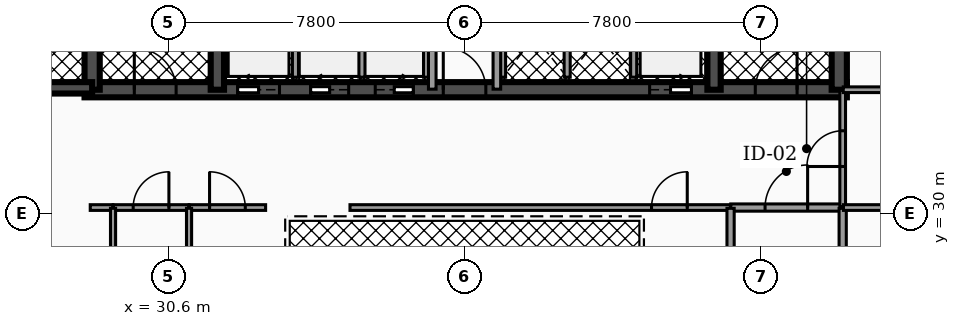
"""IFC4 building model, lengths in metres.
Left out: names, types, materials, properties, quantities, classifications, styles, units other than length and angle.
Written with IfcOpenShell. Run it as: python <this file> out.ifc"""

import sys

from ifc_helpers import new_model, si_unit, direction, frame, frame_2d, origin, place, context, subcontext, project, spatial, rectangle, extrude, element, fill, save


model = new_model("IFC4")
c1 = context("Model", 3, precision=1e-05, world=origin(), true_north=direction((0.0, 1.0)))
c2 = subcontext(c1, "Body", "Model", "MODEL_VIEW")
j1 = project(units=[si_unit("LENGTHUNIT", "METRE"), si_unit("PLANEANGLEUNIT", "RADIAN")], contexts=[c1])
p1 = place(None, origin())
s1 = spatial("IfcSite", under=j1, at=p1, CompositionType="ELEMENT")
p2 = place(p1, origin())
s2 = spatial("IfcBuilding", under=s1, at=p2, CompositionType="ELEMENT")
p3 = place(p2, frame((0.0, 0.0, 130.9)))
s3 = spatial("IfcBuildingStorey", under=s2, at=p3, CompositionType="ELEMENT", Elevation=130.9)
p4 = place(p3, frame((28.4, 33.25, 0.0), z_axis=(0.0, 0.0, 1.0), x_axis=(1.0, 0.0, 0.0)))
e1 = element("IfcWall", 1, at=p4, inside=s3, PredefinedType="SHEAR", context=c2, shape_type="SweptSolid", body=[
    extrude(rectangle(XDim=20.06, YDim=0.4, at=frame_2d((10.03, 0.0))), origin(), (0.0, 0.0, 1.0), 3.5),
])
p5 = place(p4, frame((4.03, 0.0, 0.0)))
e2 = element("IfcOpeningElement", 2, at=p5, cuts=e1, PredefinedType="OPENING", context=c2, shape_type="SweptSolid", body=[
    extrude(rectangle(XDim=1.1, YDim=2.15, at=frame_2d((0.55, 1.075))), frame((0.0, 0.21, 0.0), z_axis=(0.0, -1.0, 0.0), x_axis=(1.0, 0.0, 0.0)), (0.0, 0.0, 1.0), 0.42),
])
p6 = place(p4, frame((14.87, 0.0, 0.0)))
e3 = element("IfcOpeningElement", 3, at=p6, cuts=e1, PredefinedType="OPENING", context=c2, shape_type="SweptSolid", body=[
    extrude(rectangle(XDim=1.1, YDim=2.15, at=frame_2d((0.55, 1.075))), frame((0.0, 0.21, 0.0), z_axis=(0.0, -1.0, 0.0), x_axis=(1.0, 0.0, 0.0)), (0.0, 0.0, 1.0), 0.42),
])
p7 = place(p4, frame((5.95, 0.0, 0.0)))
e4 = element("IfcOpeningElement", 4, at=p7, cuts=e1, PredefinedType="OPENING", context=c2, shape_type="SweptSolid", body=[
    extrude(rectangle(XDim=1.0, YDim=2.1, at=frame_2d((0.5, 1.05))), frame((0.0, 0.21, 0.0), z_axis=(0.0, -1.0, 0.0), x_axis=(1.0, 0.0, 0.0)), (0.0, 0.0, 1.0), 0.42),
])
p8 = place(p4, frame((7.65, 0.0, 0.0)))
e5 = element("IfcOpeningElement", 5, at=p8, cuts=e1, PredefinedType="OPENING", context=c2, shape_type="SweptSolid", body=[
    extrude(rectangle(XDim=1.0, YDim=2.1, at=frame_2d((0.5, 1.05))), frame((0.0, 0.21, 0.0), z_axis=(0.0, -1.0, 0.0), x_axis=(1.0, 0.0, 0.0)), (0.0, 0.0, 1.0), 0.42),
])
p9 = place(p4, frame((1.31, 0.0, 0.0)))
e6 = element("IfcOpeningElement", 6, at=p9, cuts=e1, PredefinedType="OPENING", context=c2, shape_type="SweptSolid", body=[
    extrude(rectangle(XDim=1.1, YDim=2.2, at=frame_2d((0.55, 1.1))), frame((0.0, 0.21, 0.0), z_axis=(0.0, -1.0, 0.0), x_axis=(1.0, 0.0, 0.0)), (0.0, 0.0, 1.0), 0.42),
])
p10 = place(p4, frame((9.44, 0.0, 0.0)))
e7 = element("IfcOpeningElement", 7, at=p10, cuts=e1, PredefinedType="OPENING", context=c2, shape_type="SweptSolid", body=[
    extrude(rectangle(XDim=1.12, YDim=2.05, at=frame_2d((0.56, 1.025))), frame((0.0, 0.21, 0.0), z_axis=(0.0, -1.0, 0.0), x_axis=(1.0, 0.0, 0.0)), (0.0, 0.0, 1.0), 0.42),
])
p11 = place(p4, frame((17.65, 0.0, 0.0)))
e8 = element("IfcOpeningElement", 8, at=p11, cuts=e1, PredefinedType="OPENING", context=c2, shape_type="SweptSolid", body=[
    extrude(rectangle(XDim=1.1, YDim=2.2, at=frame_2d((0.55, 1.1))), frame((0.0, 0.21, 0.0), z_axis=(0.0, -1.0, 0.0), x_axis=(1.0, 0.0, 0.0)), (0.0, 0.0, 1.0), 0.42),
])
p12 = place(p3, frame((28.6, 33.25, 0.0), z_axis=(0.0, 0.0, 1.0), x_axis=(0.0, 1.0, 0.0)))
e9 = element("IfcWall", 9, at=p12, inside=s3, PredefinedType="SHEAR", context=c2, shape_type="SweptSolid", body=[
    extrude(rectangle(XDim=10.2, YDim=0.4, at=frame_2d((5.1, 0.0))), origin(), (0.0, 0.0, 1.0), 3.5),
])
for number, where, z_axis, x_axis in (
    (10, (31.895, 33.25, 0.0), (0.0, 0.0, 1.0), (0.0, 1.0, 0.0)),
    (11, (44.965, 33.25, 0.0), (0.0, 0.0, 1.0), (0.0, 1.0, 0.0)),
):
    element("IfcWall", number, at=place(p3, frame(where, z_axis=z_axis, x_axis=x_axis)), inside=s3, PredefinedType="SHEAR", context=c2, shape_type="SweptSolid", body=[
        extrude(rectangle(XDim=10.2, YDim=0.35, at=frame_2d((5.1, 0.0))), origin(), (0.0, 0.0, 1.0), 3.5),
    ])
p13 = place(p3, frame((48.26, 33.25, 0.0), z_axis=(0.0, 0.0, 1.0), x_axis=(0.0, 1.0, 0.0)))
e12 = element("IfcWall", 12, at=p13, inside=s3, PredefinedType="SHEAR", context=c2, shape_type="SweptSolid", body=[
    extrude(rectangle(XDim=10.2, YDim=0.4, at=frame_2d((5.1, 0.0))), origin(), (0.0, 0.0, 1.0), 3.5),
])
p14 = place(p3, frame((25.08, 33.3, 0.0), z_axis=(0.0, 0.0, 1.0), x_axis=(1.0, 0.0, 0.0)))
e13 = element("IfcWall", 13, at=p14, inside=s3, PredefinedType="SHEAR", context=c2, shape_type="SweptSolid", body=[
    extrude(rectangle(XDim=3.52, YDim=0.3, at=frame_2d((1.76, 0.0))), origin(), (0.0, 0.0, 1.0), 3.5),
])
p15 = place(p14, frame((1.335, 0.0, 0.0)))
e14 = element("IfcOpeningElement", 14, at=p15, cuts=e13, PredefinedType="OPENING", context=c2, shape_type="SweptSolid", body=[
    extrude(rectangle(XDim=0.95, YDim=2.2, at=frame_2d((0.475, 1.1))), frame((0.0, 0.16, 0.0), z_axis=(0.0, -1.0, 0.0), x_axis=(1.0, 0.0, 0.0)), (0.0, 0.0, 1.0), 0.32),
])
for number, where, z_axis, x_axis in (
    (15, (33.95, 33.58, 0.0), (0.0, 0.0, 1.0), (0.0, 1.0, 0.0)),
    (16, (42.85, 33.58, 0.0), (0.0, 0.0, 1.0), (0.0, 1.0, 0.0)),
):
    element("IfcWall", number, at=place(p3, frame(where, z_axis=z_axis, x_axis=x_axis)), inside=s3, PredefinedType="SOLIDWALL", context=c2, shape_type="SweptSolid", body=[
        extrude(rectangle(XDim=2.45, YDim=0.16, at=frame_2d((1.225, 0.0))), origin(), (0.0, 0.0, 1.0), 2.472),
    ])
for number, where, z_axis, x_axis in (
    (17, (35.7, 33.58, 0.0), (0.0, 0.0, 1.0), (0.0, 1.0, 0.0)),
    (18, (37.4, 33.58, 0.0), (0.0, 0.0, 1.0), (0.0, 1.0, 0.0)),
    (19, (39.4, 33.58, 0.0), (0.0, 0.0, 1.0), (0.0, 1.0, 0.0)),
    (20, (41.1, 33.58, 0.0), (0.0, 0.0, 1.0), (0.0, 1.0, 0.0)),
):
    element("IfcWall", number, at=place(p3, frame(where, z_axis=z_axis, x_axis=x_axis)), inside=s3, PredefinedType="SOLIDWALL", context=c2, shape_type="SweptSolid", body=[
        extrude(rectangle(XDim=2.25, YDim=0.16, at=frame_2d((1.125, 0.0))), origin(), (0.0, 0.0, 1.0), 2.472),
    ])
p16 = place(p3, frame((37.55, 33.265, 0.0), z_axis=(0.0, 0.0, 1.0), x_axis=(0.0, 1.0, 0.0)))
e21 = element("IfcWall", 21, at=p16, inside=s3, PredefinedType="PARTITIONING", context=c2, shape_type="SweptSolid", body=[
    extrude(rectangle(XDim=4.265, YDim=0.2, at=frame_2d((2.133, 0.0))), origin(), (0.0, 0.0, 1.0), 2.457),
])
p17 = place(p16, frame((3.093, 0.0, 0.0)))
e22 = element("IfcOpeningElement", 22, at=p17, cuts=e21, PredefinedType="OPENING", context=c2, shape_type="SweptSolid", body=[
    extrude(rectangle(XDim=0.88, YDim=2.05, at=frame_2d((0.44, 1.025))), frame((0.0, 0.11, 0.0), z_axis=(0.0, -1.0, 0.0), x_axis=(1.0, 0.0, 0.0)), (0.0, 0.0, 1.0), 0.22),
])
p18 = place(p3, frame((39.25, 33.265, 0.0), z_axis=(0.0, 0.0, 1.0), x_axis=(0.0, 1.0, 0.0)))
e23 = element("IfcWall", 23, at=p18, inside=s3, PredefinedType="PARTITIONING", context=c2, shape_type="SweptSolid", body=[
    extrude(rectangle(XDim=4.265, YDim=0.2, at=frame_2d((2.133, 0.0))), origin(), (0.0, 0.0, 1.0), 2.457),
])
p19 = place(p18, frame((3.093, 0.0, 0.0)))
e24 = element("IfcOpeningElement", 24, at=p19, cuts=e23, PredefinedType="OPENING", context=c2, shape_type="SweptSolid", body=[
    extrude(rectangle(XDim=0.88, YDim=2.05, at=frame_2d((0.44, 1.025))), frame((0.0, 0.11, 0.0), z_axis=(0.0, -1.0, 0.0), x_axis=(1.0, 0.0, 0.0)), (0.0, 0.0, 1.0), 0.22),
])
p20 = place(p3, frame((45.405, 30.15, 0.0), z_axis=(0.0, 0.0, 1.0), x_axis=(1.0, 0.0, 0.0)))
e25 = element("IfcWall", 25, at=p20, inside=s3, PredefinedType="PARTITIONING", context=c2, shape_type="SweptSolid", body=[
    extrude(rectangle(XDim=2.925, YDim=0.19, at=frame_2d((1.462, 0.0))), origin(), (0.0, 0.0, 1.0), 2.457),
])
p21 = place(p20, frame((0.903, 0.0, 0.0)))
e26 = element("IfcOpeningElement", 26, at=p21, cuts=e25, PredefinedType="OPENING", context=c2, shape_type="SweptSolid", body=[
    extrude(rectangle(XDim=1.12, YDim=2.05, at=frame_2d((0.56, 1.025))), frame((0.0, 0.105, 0.0), z_axis=(0.0, -1.0, 0.0), x_axis=(1.0, 0.0, 0.0)), (0.0, 0.0, 1.0), 0.21),
])
p22 = place(p3, frame((48.35, 30.17, 0.0), z_axis=(0.0, 0.0, 1.0), x_axis=(0.0, 1.0, 0.0)))
e27 = element("IfcWall", 27, at=p22, inside=s3, PredefinedType="PARTITIONING", context=c2, shape_type="SweptSolid", body=[
    extrude(rectangle(XDim=3.06, YDim=0.15, at=frame_2d((1.53, 0.0))), origin(), (0.0, 0.0, 1.0), 2.457),
])
p23 = place(p22, frame((1.06, 0.0, 0.0)))
e28 = element("IfcOpeningElement", 28, at=p23, cuts=e27, PredefinedType="OPENING", context=c2, shape_type="SweptSolid", body=[
    extrude(rectangle(XDim=0.94, YDim=2.05, at=frame_2d((0.47, 1.025))), frame((0.0, 0.085, 0.0), z_axis=(0.0, -1.0, 0.0), x_axis=(1.0, 0.0, 0.0)), (0.0, 0.0, 1.0), 0.17),
])
p24 = place(p3, frame((28.55, 30.15, 0.0), z_axis=(0.0, 0.0, 1.0), x_axis=(1.0, 0.0, 0.0)))
e29 = element("IfcWall", 29, at=p24, inside=s3, PredefinedType="PARTITIONING", context=c2, shape_type="SweptSolid", body=[
    extrude(rectangle(XDim=0.595, YDim=0.15, at=frame_2d((0.297, 0.0))), origin(), (0.0, 0.0, 1.0), 2.457),
])
p25 = place(p3, frame((29.155, 30.15, 0.0), z_axis=(0.0, 0.0, 1.0), x_axis=(1.0, 0.0, 0.0)))
e30 = element("IfcWall", 30, at=p25, inside=s3, PredefinedType="PARTITIONING", context=c2, shape_type="SweptSolid", body=[
    extrude(rectangle(XDim=1.99, YDim=0.15, at=frame_2d((0.995, 0.0))), origin(), (0.0, 0.0, 1.0), 2.457),
])
p26 = place(p25, frame((0.525, 0.0, 0.0)))
e31 = element("IfcOpeningElement", 31, at=p26, cuts=e30, PredefinedType="OPENING", context=c2, shape_type="SweptSolid", body=[
    extrude(rectangle(XDim=0.94, YDim=2.05, at=frame_2d((0.47, 1.025))), frame((0.0, 0.085, 0.0), z_axis=(0.0, -1.0, 0.0), x_axis=(1.0, 0.0, 0.0)), (0.0, 0.0, 1.0), 0.17),
])
p27 = place(p3, frame((31.155, 30.15, 0.0), z_axis=(0.0, 0.0, 1.0), x_axis=(1.0, 0.0, 0.0)))
e32 = element("IfcWall", 32, at=p27, inside=s3, PredefinedType="PARTITIONING", context=c2, shape_type="SweptSolid", body=[
    extrude(rectangle(XDim=2.01, YDim=0.15, at=frame_2d((1.005, 0.0))), origin(), (0.0, 0.0, 1.0), 2.457),
])
p28 = place(p27, frame((0.535, 0.0, 0.0)))
e33 = element("IfcOpeningElement", 33, at=p28, cuts=e32, PredefinedType="OPENING", context=c2, shape_type="SweptSolid", body=[
    extrude(rectangle(XDim=0.94, YDim=2.05, at=frame_2d((0.47, 1.025))), frame((0.0, 0.085, 0.0), z_axis=(0.0, -1.0, 0.0), x_axis=(1.0, 0.0, 0.0)), (0.0, 0.0, 1.0), 0.17),
])
p29 = place(p3, frame((35.385, 30.15, 0.0), z_axis=(0.0, 0.0, 1.0), x_axis=(1.0, 0.0, 0.0)))
e34 = element("IfcWall", 34, at=p29, inside=s3, PredefinedType="PARTITIONING", context=c2, shape_type="SweptSolid", body=[
    extrude(rectangle(XDim=10.01, YDim=0.15, at=frame_2d((5.005, 0.0))), origin(), (0.0, 0.0, 1.0), 2.457),
])
p30 = place(p29, frame((7.935, 0.0, 0.0)))
e35 = element("IfcOpeningElement", 35, at=p30, cuts=e34, PredefinedType="OPENING", context=c2, shape_type="SweptSolid", body=[
    extrude(rectangle(XDim=0.94, YDim=2.05, at=frame_2d((0.47, 1.025))), frame((0.0, 0.085, 0.0), z_axis=(0.0, -1.0, 0.0), x_axis=(1.0, 0.0, 0.0)), (0.0, 0.0, 1.0), 0.17),
])
for number, where, z_axis, x_axis in (
    (36, (45.4, 27.37, 0.0), (0.0, 0.0, 1.0), (0.0, 1.0, 0.0)),
    (37, (48.35, 27.37, 0.0), (0.0, 0.0, 1.0), (0.0, 1.0, 0.0)),
):
    element("IfcWall", number, at=place(p3, frame(where, z_axis=z_axis, x_axis=x_axis)), inside=s3, PredefinedType="PARTITIONING", context=c2, shape_type="SweptSolid", body=[
        extrude(rectangle(XDim=2.76, YDim=0.19, at=frame_2d((1.38, 0.0))), origin(), (0.0, 0.0, 1.0), 2.457),
    ])
p31 = place(p3, frame((48.37, 30.15, 0.0), z_axis=(0.0, 0.0, 1.0), x_axis=(1.0, 0.0, 0.0)))
e38 = element("IfcWall", 38, at=p31, inside=s3, PredefinedType="PARTITIONING", context=c2, shape_type="SweptSolid", body=[
    extrude(rectangle(XDim=3.26, YDim=0.15, at=frame_2d((1.63, 0.0))), origin(), (0.0, 0.0, 1.0), 2.457),
])
p32 = place(p31, frame((1.16, 0.0, 0.0)))
e39 = element("IfcOpeningElement", 39, at=p32, cuts=e38, PredefinedType="OPENING", context=c2, shape_type="SweptSolid", body=[
    extrude(rectangle(XDim=0.94, YDim=2.05, at=frame_2d((0.47, 1.025))), frame((0.0, 0.085, 0.0), z_axis=(0.0, -1.0, 0.0), x_axis=(1.0, 0.0, 0.0)), (0.0, 0.0, 1.0), 0.17),
])
p33 = place(p3, frame((48.365, 33.25, 0.0), z_axis=(0.0, 0.0, 1.0), x_axis=(1.0, 0.0, 0.0)))
e40 = element("IfcWall", 40, at=p33, inside=s3, PredefinedType="PARTITIONING", context=c2, shape_type="SweptSolid", body=[
    extrude(rectangle(XDim=3.265, YDim=0.15, at=frame_2d((1.632, 0.0))), origin(), (0.0, 0.0, 1.0), 2.457),
])
p34 = place(p3, frame((29.15, 27.17, 0.0), z_axis=(0.0, 0.0, 1.0), x_axis=(0.0, 1.0, 0.0)))
e41 = element("IfcWall", 41, at=p34, inside=s3, PredefinedType="PARTITIONING", context=c2, shape_type="SweptSolid", body=[
    extrude(rectangle(XDim=2.96, YDim=0.135, at=frame_2d((1.48, 0.0))), origin(), (0.0, 0.0, 1.0), 2.457),
])
p35 = place(p34, frame((1.05, 0.0, 0.0)))
e42 = element("IfcOpeningElement", 42, at=p35, cuts=e41, PredefinedType="OPENING", context=c2, shape_type="SweptSolid", body=[
    extrude(rectangle(XDim=0.86, YDim=2.05, at=frame_2d((0.43, 1.025))), frame((0.0, 0.077, 0.0), z_axis=(0.0, -1.0, 0.0), x_axis=(1.0, 0.0, 0.0)), (0.0, 0.0, 1.0), 0.155),
])
p36 = place(p3, frame((31.15, 27.17, 0.0), z_axis=(0.0, 0.0, 1.0), x_axis=(0.0, 1.0, 0.0)))
e43 = element("IfcWall", 43, at=p36, inside=s3, PredefinedType="PARTITIONING", context=c2, shape_type="SweptSolid", body=[
    extrude(rectangle(XDim=2.96, YDim=0.135, at=frame_2d((1.48, 0.0))), origin(), (0.0, 0.0, 1.0), 2.457),
])
p37 = place(p5, origin())
e44 = element("IfcDoor", 44, at=p37, inside=s3, OperationType="SLIDING_TO_LEFT", PredefinedType="DOOR", context=c2, shape_type="SweptSolid", body=[
    extrude(rectangle(XDim=1.1, YDim=2.15, at=frame_2d((0.55, 1.075))), frame((0.0, 0.025, 0.0), z_axis=(0.0, -1.0, 0.0), x_axis=(1.0, 0.0, 0.0)), (0.0, 0.0, 1.0), 0.05),
])
fill(e2, e44)
p38 = place(p6, origin())
e45 = element("IfcDoor", 45, at=p38, inside=s3, OperationType="SLIDING_TO_RIGHT", PredefinedType="DOOR", context=c2, shape_type="SweptSolid", body=[
    extrude(rectangle(XDim=1.1, YDim=2.15, at=frame_2d((0.55, 1.075))), frame((0.0, 0.025, 0.0), z_axis=(0.0, -1.0, 0.0), x_axis=(1.0, 0.0, 0.0)), (0.0, 0.0, 1.0), 0.05),
])
fill(e3, e45)
p39 = place(p7, origin())
e46 = element("IfcDoor", 46, at=p39, inside=s3, OperationType="SLIDING_TO_LEFT", PredefinedType="DOOR", context=c2, shape_type="SweptSolid", body=[
    extrude(rectangle(XDim=1.0, YDim=2.1, at=frame_2d((0.5, 1.05))), frame((0.0, 0.025, 0.0), z_axis=(0.0, -1.0, 0.0), x_axis=(1.0, 0.0, 0.0)), (0.0, 0.0, 1.0), 0.05),
])
fill(e4, e46)
p40 = place(p8, origin())
e47 = element("IfcDoor", 47, at=p40, inside=s3, OperationType="SLIDING_TO_RIGHT", PredefinedType="DOOR", context=c2, shape_type="SweptSolid", body=[
    extrude(rectangle(XDim=1.0, YDim=2.1, at=frame_2d((0.5, 1.05))), frame((0.0, 0.025, 0.0), z_axis=(0.0, -1.0, 0.0), x_axis=(1.0, 0.0, 0.0)), (0.0, 0.0, 1.0), 0.05),
])
fill(e5, e47)
p41 = place(p9, origin())
e48 = element("IfcDoor", 48, at=p41, inside=s3, OperationType="SINGLE_SWING_LEFT", PredefinedType="DOOR", context=c2, shape_type="SweptSolid", body=[
    extrude(rectangle(XDim=1.1, YDim=2.2, at=frame_2d((0.55, 1.1))), frame((0.0, 0.025, 0.0), z_axis=(0.0, -1.0, 0.0), x_axis=(1.0, 0.0, 0.0)), (0.0, 0.0, 1.0), 0.05),
])
fill(e6, e48)
p42 = place(p10, origin())
e49 = element("IfcDoor", 49, at=p42, inside=s3, OperationType="SINGLE_SWING_LEFT", PredefinedType="DOOR", context=c2, shape_type="SweptSolid", body=[
    extrude(rectangle(XDim=1.12, YDim=2.05, at=frame_2d((0.56, 1.025))), frame((0.0, 0.025, 0.0), z_axis=(0.0, -1.0, 0.0), x_axis=(1.0, 0.0, 0.0)), (0.0, 0.0, 1.0), 0.05),
])
fill(e7, e49)
p43 = place(p11, origin())
e50 = element("IfcDoor", 50, at=p43, inside=s3, OperationType="SINGLE_SWING_RIGHT", PredefinedType="DOOR", context=c2, shape_type="SweptSolid", body=[
    extrude(rectangle(XDim=1.1, YDim=2.2, at=frame_2d((0.55, 1.1))), frame((0.0, 0.025, 0.0), z_axis=(0.0, -1.0, 0.0), x_axis=(1.0, 0.0, 0.0)), (0.0, 0.0, 1.0), 0.05),
])
fill(e8, e50)
p44 = place(p21, origin())
e51 = element("IfcDoor", 51, at=p44, inside=s3, OperationType="SINGLE_SWING_RIGHT", PredefinedType="DOOR", context=c2, shape_type="SweptSolid", body=[
    extrude(rectangle(XDim=1.12, YDim=2.05, at=frame_2d((0.56, 1.025))), frame((0.0, 0.025, 0.0), z_axis=(0.0, -1.0, 0.0), x_axis=(1.0, 0.0, 0.0)), (0.0, 0.0, 1.0), 0.05),
])
fill(e26, e51)
p45 = place(p23, origin())
e52 = element("IfcDoor", 52, at=p45, inside=s3, OperationType="SINGLE_SWING_LEFT", PredefinedType="DOOR", context=c2, shape_type="SweptSolid", body=[
    extrude(rectangle(XDim=0.94, YDim=2.05, at=frame_2d((0.47, 1.025))), frame((0.0, 0.025, 0.0), z_axis=(0.0, -1.0, 0.0), x_axis=(1.0, 0.0, 0.0)), (0.0, 0.0, 1.0), 0.05),
])
fill(e28, e52)
p46 = place(p26, origin())
e53 = element("IfcDoor", 53, at=p46, inside=s3, OperationType="SINGLE_SWING_RIGHT", PredefinedType="DOOR", context=c2, shape_type="SweptSolid", body=[
    extrude(rectangle(XDim=0.94, YDim=2.05, at=frame_2d((0.47, 1.025))), frame((0.0, 0.025, 0.0), z_axis=(0.0, -1.0, 0.0), x_axis=(1.0, 0.0, 0.0)), (0.0, 0.0, 1.0), 0.05),
])
fill(e31, e53)
p47 = place(p28, origin())
e54 = element("IfcDoor", 54, at=p47, inside=s3, OperationType="SINGLE_SWING_LEFT", PredefinedType="DOOR", context=c2, shape_type="SweptSolid", body=[
    extrude(rectangle(XDim=0.94, YDim=2.05, at=frame_2d((0.47, 1.025))), frame((0.0, 0.025, 0.0), z_axis=(0.0, -1.0, 0.0), x_axis=(1.0, 0.0, 0.0)), (0.0, 0.0, 1.0), 0.05),
])
fill(e33, e54)
p48 = place(p30, origin())
e55 = element("IfcDoor", 55, at=p48, inside=s3, OperationType="SINGLE_SWING_RIGHT", PredefinedType="DOOR", context=c2, shape_type="SweptSolid", body=[
    extrude(rectangle(XDim=0.94, YDim=2.05, at=frame_2d((0.47, 1.025))), frame((0.0, 0.025, 0.0), z_axis=(0.0, -1.0, 0.0), x_axis=(1.0, 0.0, 0.0)), (0.0, 0.0, 1.0), 0.05),
])
fill(e35, e55)
save(model, sys.argv[1])
